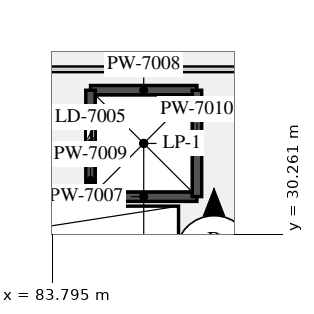
"""IFC4 building model, lengths in metres.
Left out: names, types, materials, properties, quantities, classifications, styles, units other than length and angle.
Written with IfcOpenShell. Run it as: python <this file> out.ifc"""

import sys

from ifc_helpers import new_model, si_unit, direction, frame, frame_2d, origin, place, context, subcontext, project, spatial, rectangle, extrude, element, fill, save


model = new_model("IFC4")
c1 = context("Model", 3, precision=1e-05, world=origin(), true_north=direction((0.0, 1.0)))
c2 = subcontext(c1, "Body", "Model", "MODEL_VIEW")
j1 = project(units=[si_unit("LENGTHUNIT", "METRE"), si_unit("PLANEANGLEUNIT", "RADIAN")], contexts=[c1])
p1 = place(None, origin())
s1 = spatial("IfcSite", under=j1, at=p1, CompositionType="ELEMENT")
p2 = place(p1, origin())
s2 = spatial("IfcBuilding", under=s1, at=p2, CompositionType="ELEMENT")
p3 = place(p2, frame((0.0, 0.0, -6.0)))
s3 = spatial("IfcBuildingStorey", under=s2, at=p3, CompositionType="ELEMENT", Elevation=-6.0)
for number, where, z_axis, x_axis in (
    (1, (84.8, 31.25, 0.0), (0.0, 0.0, 1.0), (1.0, 0.0, 0.0)),
    (2, (84.8, 34.05, 0.0), (0.0, 0.0, 1.0), (1.0, 0.0, 0.0)),
):
    element("IfcWall", number, at=place(p3, frame(where, z_axis=z_axis, x_axis=x_axis)), inside=s3, PredefinedType="SOLIDWALL", context=c2, shape_type="SweptSolid", body=[
        extrude(rectangle(XDim=2.8, YDim=0.25, at=frame_2d((1.4, 0.0))), origin(), (0.0, 0.0, 1.0), 5.598),
    ])
p4 = place(p3, frame((84.8, 31.25, 0.0), z_axis=(0.0, 0.0, 1.0), x_axis=(0.0, 1.0, 0.0)))
e3 = element("IfcWall", 3, at=p4, inside=s3, PredefinedType="SOLIDWALL", context=c2, shape_type="SweptSolid", body=[
    extrude(rectangle(XDim=2.8, YDim=0.25, at=frame_2d((1.4, 0.0))), origin(), (0.0, 0.0, 1.0), 5.598),
])
p5 = place(p4, frame((0.85, 0.0, 0.0)))
e4 = element("IfcOpeningElement", 4, at=p5, cuts=e3, PredefinedType="OPENING", context=c2, shape_type="SweptSolid", body=[
    extrude(rectangle(XDim=1.1, YDim=2.1, at=frame_2d((0.55, 1.05))), frame((0.0, 0.135, 0.0), z_axis=(0.0, -1.0, 0.0), x_axis=(1.0, 0.0, 0.0)), (0.0, 0.0, 1.0), 0.27),
])
p6 = place(p3, frame((87.6, 31.25, 0.0), z_axis=(0.0, 0.0, 1.0), x_axis=(0.0, 1.0, 0.0)))
e5 = element("IfcWall", 5, at=p6, inside=s3, PredefinedType="SOLIDWALL", context=c2, shape_type="SweptSolid", body=[
    extrude(rectangle(XDim=2.8, YDim=0.25, at=frame_2d((1.4, 0.0))), origin(), (0.0, 0.0, 1.0), 5.598),
])
p7 = place(p3, frame((71.945, 34.6, 0.0), z_axis=(0.0, 0.0, 1.0), x_axis=(1.0, 0.0, 0.0)))
e6 = element("IfcWall", 6, at=p7, inside=s3, PredefinedType="PARTITIONING", context=c2, shape_type="SweptSolid", body=[
    extrude(rectangle(XDim=18.055, YDim=0.15, at=frame_2d((9.027, 0.0))), origin(), (0.0, 0.0, 1.0), 5.598),
])
p8 = place(p5, origin())
e7 = element("IfcDoor", 7, at=p8, inside=s3, OperationType="SLIDING_TO_LEFT", PredefinedType="DOOR", context=c2, shape_type="SweptSolid", body=[
    extrude(rectangle(XDim=1.1, YDim=2.1, at=frame_2d((0.55, 1.05))), frame((0.0, 0.025, 0.0), z_axis=(0.0, -1.0, 0.0), x_axis=(1.0, 0.0, 0.0)), (0.0, 0.0, 1.0), 0.05),
])
fill(e4, e7)
save(model, sys.argv[1])
